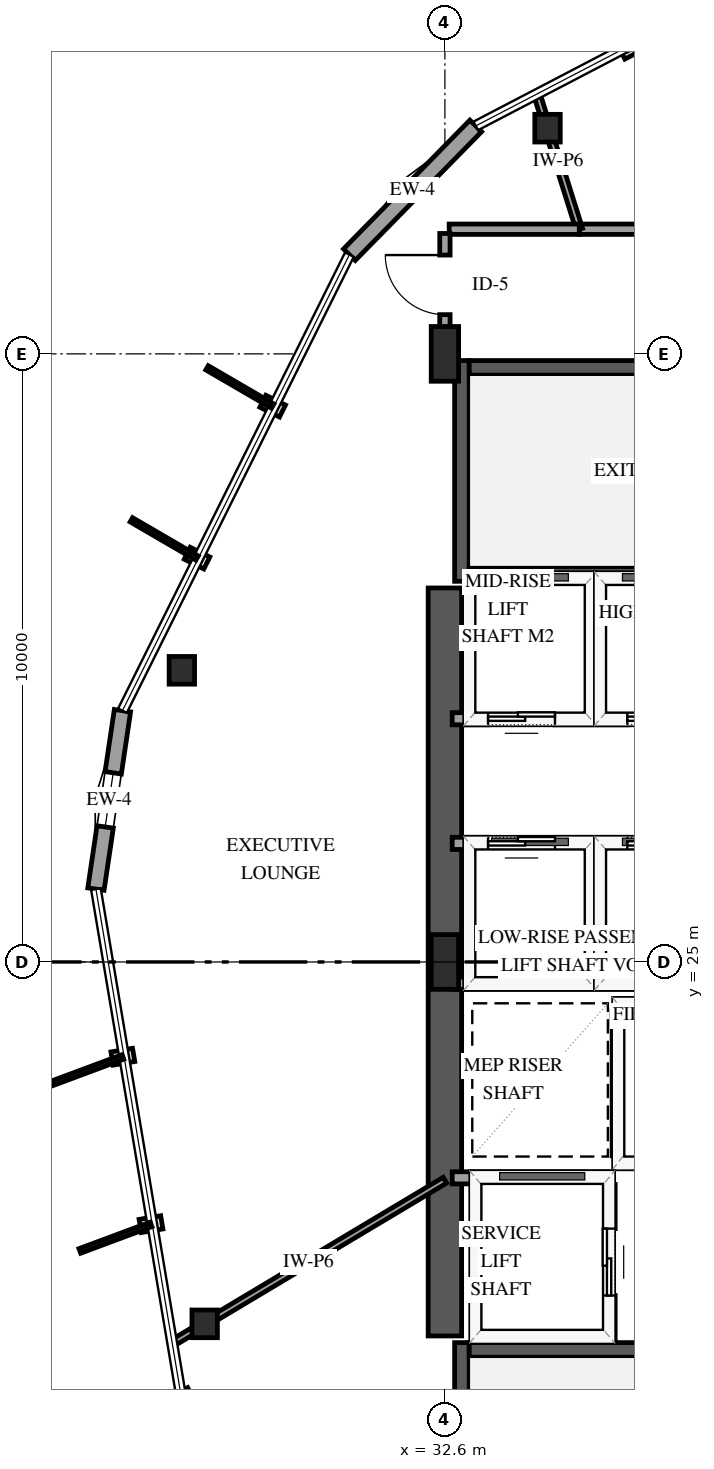
"""IFC4 building model, lengths in metres.
Left out: names, types, materials, properties, quantities, classifications, styles, units other than length and angle.
Written with IfcOpenShell. Run it as: python <this file> out.ifc"""

import sys

from ifc_helpers import new_model, si_unit, direction, frame, frame_2d, origin, origin_2d, place, context, subcontext, project, spatial, rectangle, i_section, extrude, element, fill, save


model = new_model("IFC4")
c1 = context("Model", 3, precision=1e-05, world=origin(), true_north=direction((0.0, 1.0)))
c2 = subcontext(c1, "Body", "Model", "MODEL_VIEW")
j1 = project(units=[si_unit("LENGTHUNIT", "METRE"), si_unit("PLANEANGLEUNIT", "RADIAN")], contexts=[c1])
p1 = place(None, origin())
s1 = spatial("IfcSite", under=j1, at=p1, CompositionType="ELEMENT")
p2 = place(p1, origin())
s2 = spatial("IfcBuilding", under=s1, at=p2, CompositionType="ELEMENT")
p3 = place(p2, frame((0.0, 0.0, 134.2)))
s3 = spatial("IfcBuildingStorey", under=s2, at=p3, CompositionType="ELEMENT", Elevation=134.2)
p4 = place(p3, frame((32.88, 15.11, 0.0), z_axis=(0.0, 0.0, 1.0), x_axis=(0.0, 1.0, 0.0)))
e1 = element("IfcWall", 1, at=p4, inside=s3, PredefinedType="SHEAR", context=c2, shape_type="SweptSolid", body=[
    extrude(rectangle(XDim=3.63, YDim=0.24, at=frame_2d((1.815, 0.0))), origin(), (0.0, 0.0, 1.0), 4.8),
])
p5 = place(p3, frame((33.0, 18.62, 0.0), z_axis=(0.0, 0.0, 1.0), x_axis=(1.0, 0.0, 0.0)))
e2 = element("IfcWall", 2, at=p5, inside=s3, PredefinedType="SHEAR", context=c2, shape_type="SweptSolid", body=[
    extrude(rectangle(XDim=8.0, YDim=0.24, at=frame_2d((4.0, 0.0))), origin(), (0.0, 0.0, 1.0), 4.8),
])
p6 = place(p3, frame((32.88, 31.26, 0.0), z_axis=(0.0, 0.0, 1.0), x_axis=(0.0, 1.0, 0.0)))
e3 = element("IfcWall", 3, at=p6, inside=s3, PredefinedType="SHEAR", context=c2, shape_type="SweptSolid", body=[
    extrude(rectangle(XDim=3.63, YDim=0.24, at=frame_2d((1.815, 0.0))), origin(), (0.0, 0.0, 1.0), 4.8),
])
for number, where, z_axis, x_axis in (
    (4, (33.0, 31.38, 0.0), (0.0, 0.0, 1.0), (1.0, 0.0, 0.0)),
    (5, (33.0, 34.77, 0.0), (0.0, 0.0, 1.0), (1.0, 0.0, 0.0)),
):
    element("IfcWall", number, at=place(p3, frame(where, z_axis=z_axis, x_axis=x_axis)), inside=s3, PredefinedType="SHEAR", context=c2, shape_type="SweptSolid", body=[
        extrude(rectangle(XDim=8.0, YDim=0.24, at=frame_2d((4.0, 0.0))), origin(), (0.0, 0.0, 1.0), 4.8),
    ])
p7 = place(p3, frame((32.6, 18.85, 0.0), z_axis=(0.0, 0.0, 1.0), x_axis=(0.0, 1.0, 0.0)))
e6 = element("IfcWall", 6, at=p7, inside=s3, PredefinedType="SHEAR", context=c2, shape_type="SweptSolid", body=[
    extrude(rectangle(XDim=12.3, YDim=0.55, at=frame_2d((6.15, 0.0))), origin(), (0.0, 0.0, 1.0), 4.8),
])
for number, where, z_axis, x_axis in (
    (7, (32.6, 25.0, 0.0), (0.0, 0.0, 1.0), (1.0, 0.0, 0.0)),
    (8, (32.6, 35.0, 0.0), (0.0, 0.0, 1.0), (1.0, 0.0, 0.0)),
):
    element("IfcColumn", number, at=place(p3, frame(where, z_axis=z_axis, x_axis=x_axis)), inside=s3, PredefinedType="PILASTER", context=c2, shape_type="SweptSolid", body=[
        extrude(rectangle(XDim=0.45, YDim=0.9, at=origin_2d()), origin(), (0.0, 0.0, 1.0), 4.5),
    ])
for number, where, z_axis, x_axis in (
    (9, (34.288, 38.711, 0.0), (0.0, 0.0, 1.0), (1.0, 0.0, 0.0)),
    (10, (28.274, 29.796, 0.0), (0.0, 0.0, 1.0), (1.0, 0.0, 0.0)),
    (11, (28.649, 19.049, 0.0), (0.0, 0.0, 1.0), (1.0, 0.0, 0.0)),
):
    element("IfcColumn", number, at=place(p3, frame(where, z_axis=z_axis, x_axis=x_axis)), inside=s3, PredefinedType="COLUMN", context=c2, shape_type="SweptSolid", body=[
        extrude(i_section(OverallWidth=0.418, OverallDepth=0.455, WebThickness=0.042, FlangeThickness=0.068, FilletRadius=0.038, at=origin_2d()), origin(), (0.0, 0.0, 1.0), 4.5),
    ])
p8 = place(p3, frame((33.107, 38.749, 0.0), z_axis=(0.0, 0.0, 1.0), x_axis=(-0.700409496998, -0.713741225175, 0.0)))
e12 = element("IfcWall", 12, at=p8, inside=s3, PredefinedType="SOLIDWALL", context=c2, shape_type="SweptSolid", body=[
    extrude(rectangle(XDim=2.967, YDim=0.27, at=frame_2d((1.483, 0.0))), origin(), (0.0, 0.0, 1.0), 3.879),
])
p9 = place(p3, frame((27.297, 29.133, 0.0), z_axis=(0.0, 0.0, 1.0), x_axis=(-0.147157120534, -0.989113128958, 0.0)))
e13 = element("IfcWall", 13, at=p9, inside=s3, PredefinedType="SOLIDWALL", context=c2, shape_type="SweptSolid", body=[
    extrude(rectangle(XDim=2.966, YDim=0.27, at=frame_2d((1.483, 0.0))), origin(), (0.0, 0.0, 1.0), 3.879),
])
p10 = place(p9, frame((1.033, 0.0, 0.75)))
e14 = element("IfcOpeningElement", 14, at=p10, cuts=e13, PredefinedType="OPENING", context=c2, shape_type="SweptSolid", body=[
    extrude(rectangle(XDim=0.9, YDim=1.5, at=frame_2d((0.45, 0.75))), frame((0.0, 0.145, 0.0), z_axis=(0.0, -1.0, 0.0), x_axis=(1.0, 0.0, 0.0)), (0.0, 0.0, 1.0), 0.29),
])
p11 = place(p3, frame((28.249, 17.938, 0.0), z_axis=(0.0, 0.0, 1.0), x_axis=(0.462422563067, -0.886659671558, 0.0)))
e15 = element("IfcWall", 15, at=p11, inside=s3, PredefinedType="SOLIDWALL", context=c2, shape_type="SweptSolid", body=[
    extrude(rectangle(XDim=2.967, YDim=0.27, at=frame_2d((1.483, 0.0))), origin(), (0.0, 0.0, 1.0), 3.879),
])
p12 = place(p11, frame((1.033, 0.0, 0.75)))
e16 = element("IfcOpeningElement", 16, at=p12, cuts=e15, PredefinedType="OPENING", context=c2, shape_type="SweptSolid", body=[
    extrude(rectangle(XDim=0.9, YDim=1.5, at=frame_2d((0.45, 0.75))), frame((0.0, 0.145, 0.0), z_axis=(0.0, -1.0, 0.0), x_axis=(1.0, 0.0, 0.0)), (0.0, 0.0, 1.0), 0.29),
])
p13 = place(p3, frame((35.45, 21.7, 0.0), z_axis=(0.0, 0.0, 1.0), x_axis=(1.0, 0.0, 0.0)))
e17 = element("IfcWall", 17, at=p13, inside=s3, PredefinedType="SOLIDWALL", context=c2, shape_type="SweptSolid", body=[
    extrude(rectangle(XDim=2.0, YDim=0.2, at=frame_2d((1.0, 0.0))), origin(), (0.0, 0.0, 1.0), 4.5),
])
p14 = place(p13, frame((0.45, 0.0, 0.0)))
e18 = element("IfcOpeningElement", 18, at=p14, cuts=e17, PredefinedType="OPENING", context=c2, shape_type="SweptSolid", body=[
    extrude(rectangle(XDim=1.1, YDim=2.15, at=frame_2d((0.55, 1.075))), frame((0.0, 0.11, 0.0), z_axis=(0.0, -1.0, 0.0), x_axis=(1.0, 0.0, 0.0)), (0.0, 0.0, 1.0), 0.22),
])
p15 = place(p3, frame((35.45, 24.3, 0.0), z_axis=(0.0, 0.0, 1.0), x_axis=(1.0, 0.0, 0.0)))
e19 = element("IfcWall", 19, at=p15, inside=s3, PredefinedType="SOLIDWALL", context=c2, shape_type="SweptSolid", body=[
    extrude(rectangle(XDim=2.0, YDim=0.2, at=frame_2d((1.0, 0.0))), origin(), (0.0, 0.0, 1.0), 4.5),
])
p16 = place(p3, frame((35.45, 21.81, 0.0), z_axis=(0.0, 0.0, 1.0), x_axis=(0.0, 1.0, 0.0)))
e20 = element("IfcWall", 20, at=p16, inside=s3, PredefinedType="SOLIDWALL", context=c2, shape_type="SweptSolid", body=[
    extrude(rectangle(XDim=2.38, YDim=0.2, at=frame_2d((1.19, 0.0))), origin(), (0.0, 0.0, 1.0), 4.5),
])
p17 = place(p3, frame((32.72, 21.45, 0.0), z_axis=(0.0, 0.0, 1.0), x_axis=(1.0, 0.0, 0.0)))
e21 = element("IfcWall", 21, at=p17, inside=s3, PredefinedType="SOLIDWALL", context=c2, shape_type="SweptSolid", body=[
    extrude(rectangle(XDim=2.58, YDim=0.2, at=frame_2d((1.29, 0.0))), origin(), (0.0, 0.0, 1.0), 4.5),
])
p18 = place(p3, frame((35.3, 18.79, 0.0), z_axis=(0.0, 0.0, 1.0), x_axis=(0.0, 1.0, 0.0)))
e22 = element("IfcWall", 22, at=p18, inside=s3, PredefinedType="SOLIDWALL", context=c2, shape_type="SweptSolid", body=[
    extrude(rectangle(XDim=2.55, YDim=0.2, at=frame_2d((1.275, 0.0))), origin(), (0.0, 0.0, 1.0), 4.5),
])
p19 = place(p18, frame((0.725, 0.0, 0.0)))
e23 = element("IfcOpeningElement", 23, at=p19, cuts=e22, PredefinedType="OPENING", context=c2, shape_type="SweptSolid", body=[
    extrude(rectangle(XDim=1.1, YDim=2.15, at=frame_2d((0.55, 1.075))), frame((0.0, 0.11, 0.0), z_axis=(0.0, -1.0, 0.0), x_axis=(1.0, 0.0, 0.0)), (0.0, 0.0, 1.0), 0.22),
])
p20 = place(p3, frame((32.72, 24.65, 0.0), z_axis=(0.0, 0.0, 1.0), x_axis=(1.0, 0.0, 0.0)))
e24 = element("IfcWall", 24, at=p20, inside=s3, PredefinedType="SOLIDWALL", context=c2, shape_type="SweptSolid", body=[
    extrude(rectangle(XDim=2.28, YDim=0.2, at=frame_2d((1.14, 0.0))), origin(), (0.0, 0.0, 1.0), 4.5),
])
p21 = place(p3, frame((32.72, 26.95, 0.0), z_axis=(0.0, 0.0, 1.0), x_axis=(1.0, 0.0, 0.0)))
e25 = element("IfcWall", 25, at=p21, inside=s3, PredefinedType="SOLIDWALL", context=c2, shape_type="SweptSolid", body=[
    extrude(rectangle(XDim=2.28, YDim=0.2, at=frame_2d((1.14, 0.0))), origin(), (0.0, 0.0, 1.0), 4.5),
])
p22 = place(p21, frame((0.59, 0.0, 0.0)))
e26 = element("IfcOpeningElement", 26, at=p22, cuts=e25, PredefinedType="OPENING", context=c2, shape_type="SweptSolid", body=[
    extrude(rectangle(XDim=1.1, YDim=2.15, at=frame_2d((0.55, 1.075))), frame((0.0, 0.11, 0.0), z_axis=(0.0, -1.0, 0.0), x_axis=(1.0, 0.0, 0.0)), (0.0, 0.0, 1.0), 0.22),
])
p23 = place(p3, frame((35.0, 24.76, 0.0), z_axis=(0.0, 0.0, 1.0), x_axis=(0.0, 1.0, 0.0)))
e27 = element("IfcWall", 27, at=p23, inside=s3, PredefinedType="SOLIDWALL", context=c2, shape_type="SweptSolid", body=[
    extrude(rectangle(XDim=2.08, YDim=0.2, at=frame_2d((1.04, 0.0))), origin(), (0.0, 0.0, 1.0), 4.5),
])
p24 = place(p3, frame((35.15, 24.65, 0.0), z_axis=(0.0, 0.0, 1.0), x_axis=(1.0, 0.0, 0.0)))
e28 = element("IfcWall", 28, at=p24, inside=s3, PredefinedType="SOLIDWALL", context=c2, shape_type="SweptSolid", body=[
    extrude(rectangle(XDim=2.0, YDim=0.2, at=frame_2d((1.0, 0.0))), origin(), (0.0, 0.0, 1.0), 4.5),
])
p25 = place(p3, frame((35.15, 26.95, 0.0), z_axis=(0.0, 0.0, 1.0), x_axis=(1.0, 0.0, 0.0)))
e29 = element("IfcWall", 29, at=p25, inside=s3, PredefinedType="SOLIDWALL", context=c2, shape_type="SweptSolid", body=[
    extrude(rectangle(XDim=2.0, YDim=0.2, at=frame_2d((1.0, 0.0))), origin(), (0.0, 0.0, 1.0), 4.5),
])
p26 = place(p25, frame((0.45, 0.0, 0.0)))
e30 = element("IfcOpeningElement", 30, at=p26, cuts=e29, PredefinedType="OPENING", context=c2, shape_type="SweptSolid", body=[
    extrude(rectangle(XDim=1.1, YDim=2.15, at=frame_2d((0.55, 1.075))), frame((0.0, 0.11, 0.0), z_axis=(0.0, -1.0, 0.0), x_axis=(1.0, 0.0, 0.0)), (0.0, 0.0, 1.0), 0.22),
])
p27 = place(p3, frame((32.72, 29.0, 0.0), z_axis=(0.0, 0.0, 1.0), x_axis=(1.0, 0.0, 0.0)))
e31 = element("IfcWall", 31, at=p27, inside=s3, PredefinedType="SOLIDWALL", context=c2, shape_type="SweptSolid", body=[
    extrude(rectangle(XDim=2.28, YDim=0.2, at=frame_2d((1.14, 0.0))), origin(), (0.0, 0.0, 1.0), 4.5),
])
p28 = place(p27, frame((0.59, 0.0, 0.0)))
e32 = element("IfcOpeningElement", 32, at=p28, cuts=e31, PredefinedType="OPENING", context=c2, shape_type="SweptSolid", body=[
    extrude(rectangle(XDim=1.1, YDim=2.15, at=frame_2d((0.55, 1.075))), frame((0.0, 0.11, 0.0), z_axis=(0.0, -1.0, 0.0), x_axis=(1.0, 0.0, 0.0)), (0.0, 0.0, 1.0), 0.22),
])
p29 = place(p3, frame((35.0, 29.11, 0.0), z_axis=(0.0, 0.0, 1.0), x_axis=(0.0, 1.0, 0.0)))
e33 = element("IfcWall", 33, at=p29, inside=s3, PredefinedType="SOLIDWALL", context=c2, shape_type="SweptSolid", body=[
    extrude(rectangle(XDim=2.1, YDim=0.2, at=frame_2d((1.05, 0.0))), origin(), (0.0, 0.0, 1.0), 4.5),
])
p30 = place(p3, frame((35.15, 29.0, 0.0), z_axis=(0.0, 0.0, 1.0), x_axis=(1.0, 0.0, 0.0)))
e34 = element("IfcWall", 34, at=p30, inside=s3, PredefinedType="SOLIDWALL", context=c2, shape_type="SweptSolid", body=[
    extrude(rectangle(XDim=2.0, YDim=0.2, at=frame_2d((1.0, 0.0))), origin(), (0.0, 0.0, 1.0), 4.5),
])
p31 = place(p30, frame((0.45, 0.0, 0.0)))
e35 = element("IfcOpeningElement", 35, at=p31, cuts=e34, PredefinedType="OPENING", context=c2, shape_type="SweptSolid", body=[
    extrude(rectangle(XDim=1.1, YDim=2.15, at=frame_2d((0.55, 1.075))), frame((0.0, 0.11, 0.0), z_axis=(0.0, -1.0, 0.0), x_axis=(1.0, 0.0, 0.0)), (0.0, 0.0, 1.0), 0.22),
])
p32 = place(p3, frame((34.81, 37.05, 0.0), z_axis=(0.0, 0.0, 1.0), x_axis=(1.0, 0.0, 0.0)))
e36 = element("IfcWall", 36, at=p32, inside=s3, PredefinedType="PARTITIONING", context=c2, shape_type="SweptSolid", body=[
    extrude(rectangle(XDim=7.804, YDim=0.17, at=frame_2d((3.902, 0.0))), origin(), (0.0, 0.0, 1.0), 4.5),
])
p33 = place(p32, frame((3.427, 0.0, 0.0)))
e37 = element("IfcOpeningElement", 37, at=p33, cuts=e36, PredefinedType="OPENING", context=c2, shape_type="SweptSolid", body=[
    extrude(rectangle(XDim=0.98, YDim=2.15, at=frame_2d((0.49, 1.075))), frame((0.0, 0.095, 0.0), z_axis=(0.0, -1.0, 0.0), x_axis=(1.0, 0.0, 0.0)), (0.0, 0.0, 1.0), 0.19),
])
p34 = place(p3, frame((32.6, 21.411, 0.0), z_axis=(0.0, 0.0, 1.0), x_axis=(-0.858300031482, -0.513148181287, 0.0)))
e38 = element("IfcWall", 38, at=p34, inside=s3, PredefinedType="PARTITIONING", context=c2, shape_type="SweptSolid", body=[
    extrude(rectangle(XDim=5.224, YDim=0.11, at=frame_2d((2.612, 0.0))), origin(), (0.0, 0.0, 1.0), 4.5),
])
p35 = place(p3, frame((34.81, 37.05, 0.0), z_axis=(0.0, 0.0, 1.0), x_axis=(-0.300082780879, 0.953913164088, 0.0)))
e39 = element("IfcWall", 39, at=p35, inside=s3, PredefinedType="PARTITIONING", context=c2, shape_type="SweptSolid", body=[
    extrude(rectangle(XDim=2.329, YDim=0.11, at=frame_2d((1.165, 0.0))), origin(), (0.0, 0.0, 1.0), 2.79),
])
p36 = place(p3, frame((32.67, 37.05, 0.0), z_axis=(0.0, 0.0, 1.0), x_axis=(1.0, 0.0, 0.0)))
e40 = element("IfcWall", 40, at=p36, inside=s3, PredefinedType="PARTITIONING", context=c2, shape_type="SweptSolid", body=[
    extrude(rectangle(XDim=2.14, YDim=0.17, at=frame_2d((1.07, 0.0))), origin(), (0.0, 0.0, 1.0), 4.5),
])
p37 = place(p3, frame((32.6, 35.07, 0.0), z_axis=(0.0, 0.0, 1.0), x_axis=(0.0, 1.0, 0.0)))
e41 = element("IfcWall", 41, at=p37, inside=s3, PredefinedType="PARTITIONING", context=c2, shape_type="SweptSolid", body=[
    extrude(rectangle(XDim=1.91, YDim=0.17, at=frame_2d((0.955, 0.0))), origin(), (0.0, 0.0, 1.0), 4.5),
])
p38 = place(p37, frame((0.575, 0.0, 0.0)))
e42 = element("IfcOpeningElement", 42, at=p38, cuts=e41, PredefinedType="OPENING", context=c2, shape_type="SweptSolid", body=[
    extrude(rectangle(XDim=0.98, YDim=2.15, at=frame_2d((0.49, 1.075))), frame((0.0, 0.095, 0.0), z_axis=(0.0, -1.0, 0.0), x_axis=(1.0, 0.0, 0.0)), (0.0, 0.0, 1.0), 0.19),
])
p39 = place(p10, origin())
e43 = element("IfcWindow", 43, at=p39, inside=s3, PartitioningType="SINGLE_PANEL", PredefinedType="WINDOW", context=c2, shape_type="SweptSolid", body=[
    extrude(rectangle(XDim=0.9, YDim=1.5, at=frame_2d((0.45, 0.75))), frame((0.0, 0.03, 0.0), z_axis=(0.0, -1.0, 0.0), x_axis=(1.0, 0.0, 0.0)), (0.0, 0.0, 1.0), 0.06),
])
fill(e14, e43)
p40 = place(p19, origin())
e44 = element("IfcDoor", 44, at=p40, inside=s3, OperationType="SLIDING_TO_LEFT", PredefinedType="DOOR", context=c2, shape_type="SweptSolid", body=[
    extrude(rectangle(XDim=1.1, YDim=2.15, at=frame_2d((0.55, 1.075))), frame((0.0, 0.025, 0.0), z_axis=(0.0, -1.0, 0.0), x_axis=(1.0, 0.0, 0.0)), (0.0, 0.0, 1.0), 0.05),
])
fill(e23, e44)
p41 = place(p22, origin())
e45 = element("IfcDoor", 45, at=p41, inside=s3, OperationType="SLIDING_TO_LEFT", PredefinedType="DOOR", context=c2, shape_type="SweptSolid", body=[
    extrude(rectangle(XDim=1.1, YDim=2.15, at=frame_2d((0.55, 1.075))), frame((0.0, 0.025, 0.0), z_axis=(0.0, -1.0, 0.0), x_axis=(1.0, 0.0, 0.0)), (0.0, 0.0, 1.0), 0.05),
])
fill(e26, e45)
p42 = place(p26, origin())
e46 = element("IfcDoor", 46, at=p42, inside=s3, OperationType="SLIDING_TO_LEFT", PredefinedType="DOOR", context=c2, shape_type="SweptSolid", body=[
    extrude(rectangle(XDim=1.1, YDim=2.15, at=frame_2d((0.55, 1.075))), frame((0.0, 0.025, 0.0), z_axis=(0.0, -1.0, 0.0), x_axis=(1.0, 0.0, 0.0)), (0.0, 0.0, 1.0), 0.05),
])
fill(e30, e46)
p43 = place(p28, origin())
e47 = element("IfcDoor", 47, at=p43, inside=s3, OperationType="SLIDING_TO_LEFT", PredefinedType="DOOR", context=c2, shape_type="SweptSolid", body=[
    extrude(rectangle(XDim=1.1, YDim=2.15, at=frame_2d((0.55, 1.075))), frame((0.0, 0.025, 0.0), z_axis=(0.0, -1.0, 0.0), x_axis=(1.0, 0.0, 0.0)), (0.0, 0.0, 1.0), 0.05),
])
fill(e32, e47)
p44 = place(p31, origin())
e48 = element("IfcDoor", 48, at=p44, inside=s3, OperationType="SLIDING_TO_LEFT", PredefinedType="DOOR", context=c2, shape_type="SweptSolid", body=[
    extrude(rectangle(XDim=1.1, YDim=2.15, at=frame_2d((0.55, 1.075))), frame((0.0, 0.025, 0.0), z_axis=(0.0, -1.0, 0.0), x_axis=(1.0, 0.0, 0.0)), (0.0, 0.0, 1.0), 0.05),
])
fill(e35, e48)
p45 = place(p38, origin())
e49 = element("IfcDoor", 49, at=p45, inside=s3, OperationType="SINGLE_SWING_RIGHT", PredefinedType="DOOR", context=c2, shape_type="SweptSolid", body=[
    extrude(rectangle(XDim=0.98, YDim=2.15, at=frame_2d((0.49, 1.075))), frame((0.0, 0.025, 0.0), z_axis=(0.0, -1.0, 0.0), x_axis=(1.0, 0.0, 0.0)), (0.0, 0.0, 1.0), 0.05),
])
fill(e42, e49)
save(model, sys.argv[1])
